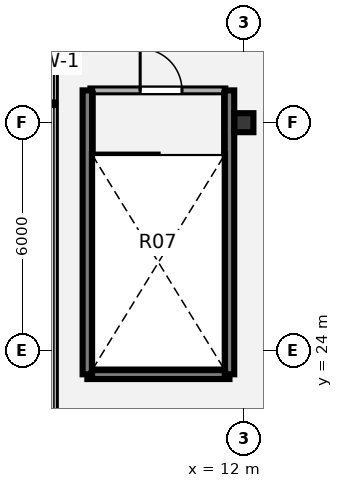
"""IFC4 building model, lengths in metres.
Left out: names, types, materials, properties, quantities, classifications, styles, units other than length and angle.
Written with IfcOpenShell. Run it as: python <this file> out.ifc"""

import sys

from ifc_helpers import new_model, si_unit, direction, frame, frame_2d, origin, origin_2d, place, context, subcontext, project, spatial, rectangle, i_section, extrude, source, transform, mapped, element, fill, save


model = new_model("IFC4")
c1 = context("Model", 3, precision=1e-05, world=origin(), true_north=direction((0.0, 1.0)))
c2 = subcontext(c1, "Body", "Model", "MODEL_VIEW")
j1 = project(units=[si_unit("LENGTHUNIT", "METRE"), si_unit("PLANEANGLEUNIT", "RADIAN")], contexts=[c1])
p1 = place(None, origin())
s1 = spatial("IfcSite", under=j1, at=p1, CompositionType="ELEMENT")
p2 = place(p1, origin())
s2 = spatial("IfcBuilding", under=s1, at=p2, CompositionType="ELEMENT")
p3 = place(p2, frame((0.0, 0.0, 22.68)))
s3 = spatial("IfcBuildingStorey", under=s2, at=p3, CompositionType="ELEMENT", Elevation=22.68)
m1 = source(origin(), c2, "Body", "SweptSolid", [
    extrude(i_section(OverallWidth=0.5, OverallDepth=0.5, WebThickness=0.022, FlangeThickness=0.035, at=origin_2d()), origin(), (0.0, 0.0, 1.0), 4.32),
])
p4 = place(p3, frame((12.0, 30.0, 0.0), z_axis=(0.0, 0.0, 1.0), x_axis=(1.0, 0.0, 0.0)))
e1 = element("IfcColumn", 1, at=p4, inside=s3, PredefinedType="COLUMN", context=c2, shape_type="MappedRepresentation", body=[
    mapped(m1, transform((0.0, 0.0, 0.0), x_axis=(1.0, 0.0, 0.0), y_axis=(0.0, 1.0, 0.0), z_axis=(0.0, 0.0, 1.0), scale=1.0)),
])
p5 = place(p3, frame((7.92, 30.85, 0.0), z_axis=(0.0, 0.0, 1.0), x_axis=(1.0, 0.0, 0.0)))
e2 = element("IfcWall", 2, at=p5, inside=s3, PredefinedType="PARTITIONING", context=c2, shape_type="SweptSolid", body=[
    extrude(rectangle(XDim=3.63, YDim=0.18, at=frame_2d((1.815, 0.0))), origin(), (0.0, 0.0, 1.0), 4.0),
])
p6 = place(p5, frame((1.35, 0.0, 0.0)))
e3 = element("IfcOpeningElement", 3, at=p6, cuts=e2, PredefinedType="OPENING", context=c2, shape_type="SweptSolid", body=[
    extrude(rectangle(XDim=1.1, YDim=2.1, at=origin_2d()), frame((0.55, 0.1, 1.05), z_axis=(0.0, -1.0, 0.0), x_axis=(1.0, 0.0, 0.0)), (0.0, 0.0, 1.0), 0.2),
])
p7 = place(p3, frame((7.88, 23.38, 0.0), z_axis=(0.0, 0.0, 1.0), x_axis=(1.0, 0.0, 0.0)))
e4 = element("IfcWall", 4, at=p7, inside=s3, PredefinedType="SHEAR", context=c2, shape_type="SweptSolid", body=[
    extrude(rectangle(XDim=3.74, YDim=0.25, at=frame_2d((1.87, 0.0))), origin(), (0.0, 0.0, 1.0), 4.32),
])
for number, where, z_axis, x_axis in (
    (5, (7.88, 23.38, 0.0), (0.0, 0.0, 1.0), (0.0, 1.0, 0.0)),
    (6, (11.62, 23.38, 0.0), (0.0, 0.0, 1.0), (0.0, 1.0, 0.0)),
):
    element("IfcWall", number, at=place(p3, frame(where, z_axis=z_axis, x_axis=x_axis)), inside=s3, PredefinedType="SHEAR", context=c2, shape_type="SweptSolid", body=[
        extrude(rectangle(XDim=7.47, YDim=0.25, at=frame_2d((3.735, 0.0))), origin(), (0.0, 0.0, 1.0), 4.32),
    ])
m2 = source(origin(), c2, "Body", "SweptSolid", [
    extrude(rectangle(XDim=1.1, YDim=2.1, at=origin_2d()), frame((0.55, 0.025, 1.05), z_axis=(0.0, -1.0, 0.0), x_axis=(1.0, 0.0, 0.0)), (0.0, 0.0, 1.0), 0.05),
])
p8 = place(p6, origin())
e7 = element("IfcDoor", 7, at=p8, inside=s3, OperationType="SINGLE_SWING_LEFT", PredefinedType="DOOR", context=c2, shape_type="MappedRepresentation", body=[
    mapped(m2, transform((0.0, 0.0, 0.0), x_axis=(1.0, 0.0, 0.0), y_axis=(0.0, 1.0, 0.0), z_axis=(0.0, 0.0, 1.0), scale=1.0)),
])
fill(e3, e7)
save(model, sys.argv[1])
